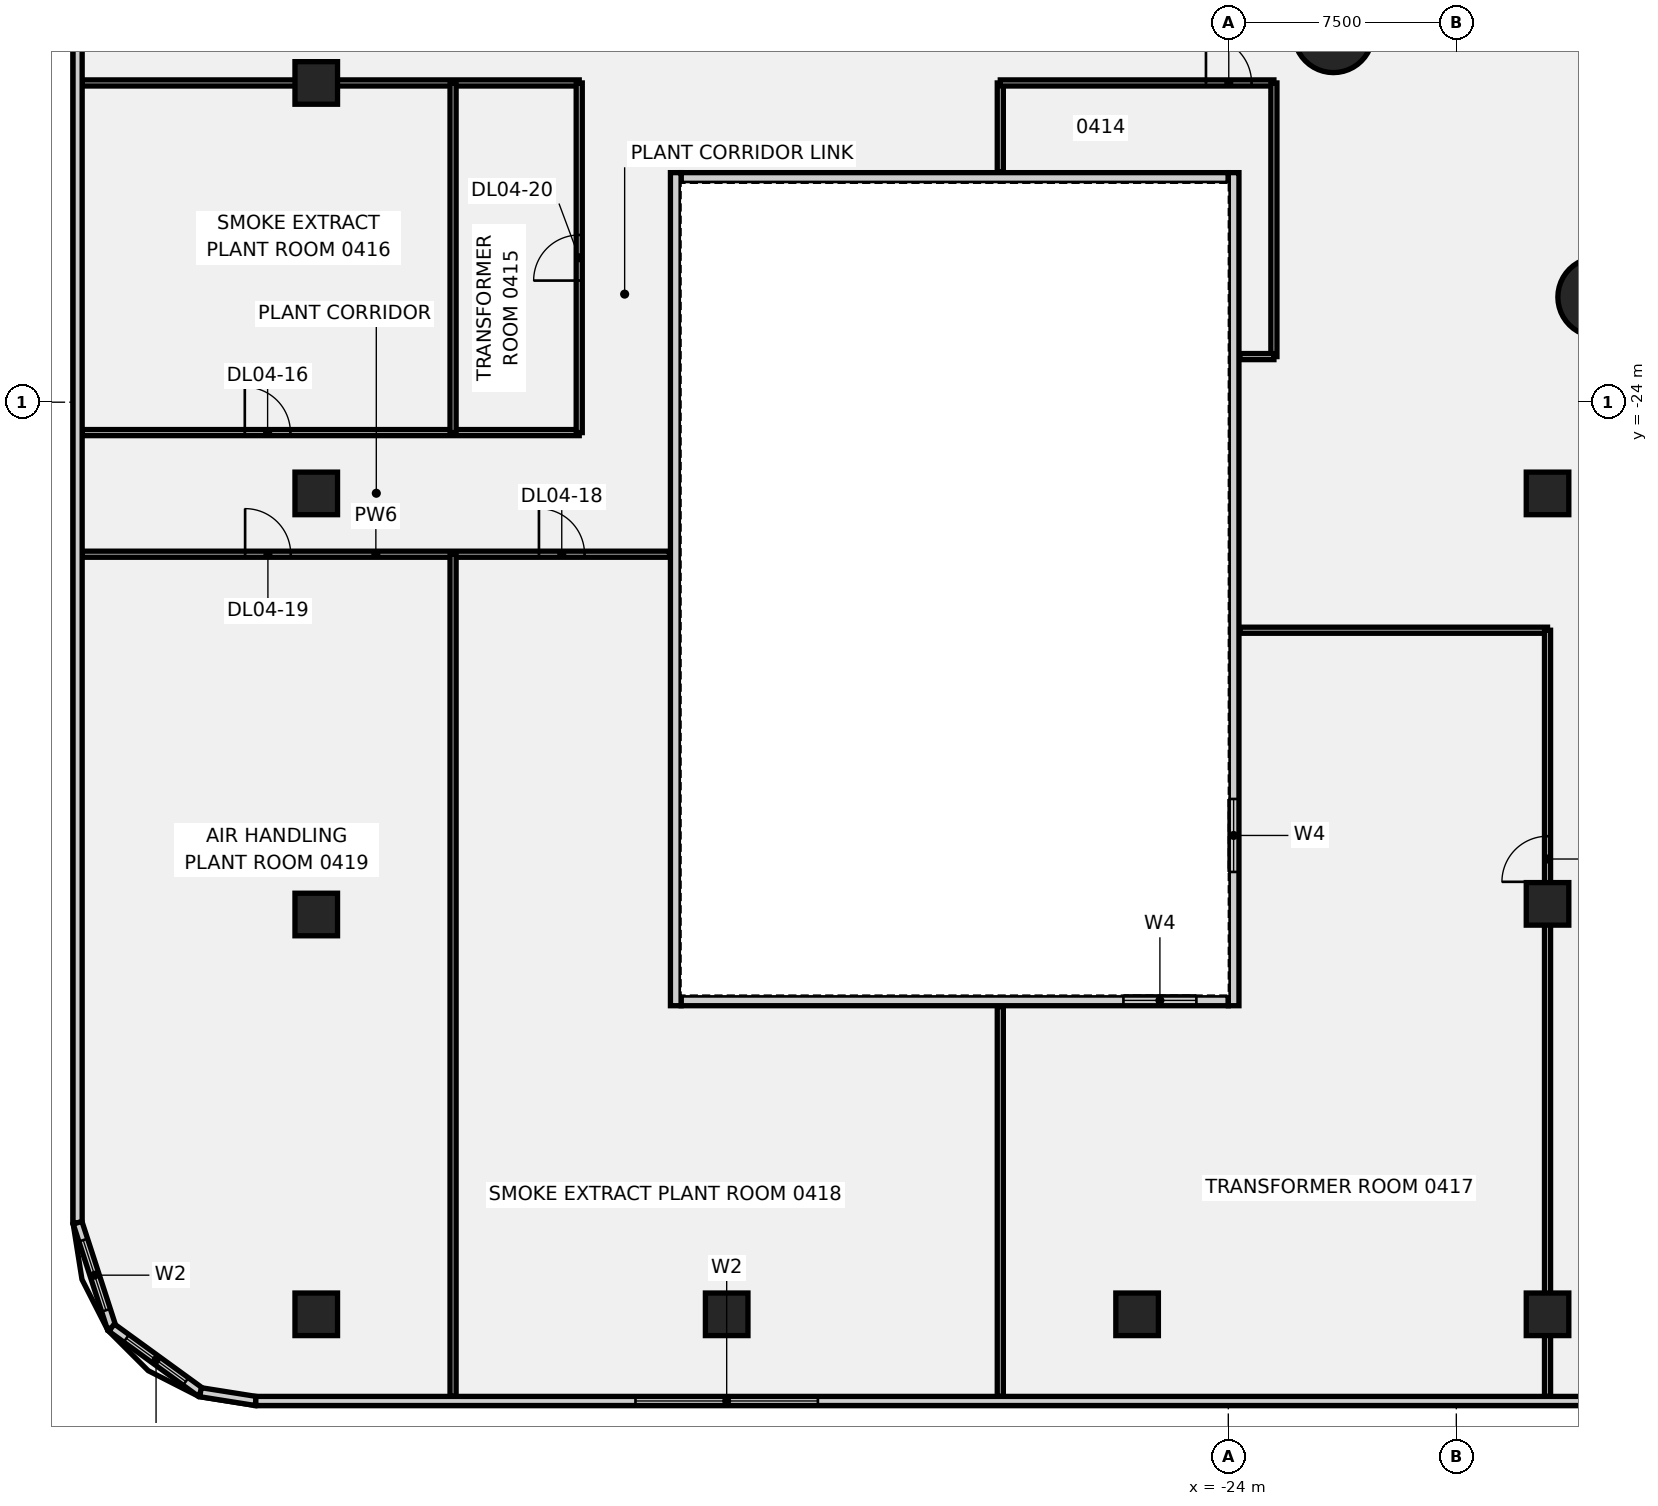
"""IFC4 building model, lengths in metres.
Left out: names, types, materials, properties, quantities, classifications, styles, units other than length and angle.
Written with IfcOpenShell. Run it as: python <this file> out.ifc"""

import sys

from ifc_helpers import new_model, si_unit, direction, frame, frame_2d, origin, origin_2d, place, context, subcontext, project, spatial, rectangle, circle, extrude, element, fill, save


model = new_model("IFC4")
c1 = context("Model", 3, precision=1e-05, world=origin(), true_north=direction((0.0, 1.0)))
c2 = subcontext(c1, "Body", "Model", "MODEL_VIEW")
j1 = project(units=[si_unit("LENGTHUNIT", "METRE"), si_unit("PLANEANGLEUNIT", "RADIAN")], contexts=[c1])
p1 = place(None, origin())
s1 = spatial("IfcSite", under=j1, at=p1, CompositionType="ELEMENT")
p2 = place(p1, origin())
s2 = spatial("IfcBuilding", under=s1, at=p2, CompositionType="ELEMENT")
p3 = place(p2, frame((0.0, 0.0, 25.0)))
s3 = spatial("IfcBuildingStorey", under=s2, at=p3, CompositionType="ELEMENT", Elevation=25.0)
for number, where, z_axis, x_axis in (
    (1, (-20.543, -11.86, -0.45), (0.0, 0.0, 1.0), (1.0, 0.0, 0.0)),
    (2, (-11.86, -20.543, -0.45), (0.0, 0.0, 1.0), (1.0, 0.0, 0.0)),
):
    element("IfcColumn", number, at=place(p3, frame(where, z_axis=z_axis, x_axis=x_axis)), inside=s3, PredefinedType="COLUMN", context=c2, shape_type="SweptSolid", body=[
        extrude(circle(Radius=1.3, at=origin_2d()), origin(), (0.0, 0.0, 1.0), 4.35),
    ])
for number, where, z_axis, x_axis in (
    (3, (-54.0, -54.0, -0.45), (0.0, 0.0, 1.0), (1.0, 0.0, 0.0)),
    (4, (-54.0, -40.85, -0.45), (0.0, 0.0, 1.0), (1.0, 0.0, 0.0)),
    (5, (-54.0, -27.0, -0.45), (0.0, 0.0, 1.0), (1.0, 0.0, 0.0)),
    (6, (-54.0, -13.5, -0.45), (0.0, 0.0, 1.0), (1.0, 0.0, 0.0)),
    (7, (-40.5, -54.0, -0.45), (0.0, 0.0, 1.0), (1.0, 0.0, 0.0)),
    (8, (-27.0, -54.0, -0.45), (0.0, 0.0, 1.0), (1.0, 0.0, 0.0)),
    (9, (-13.5, -54.0, -0.45), (0.0, 0.0, 1.0), (1.0, 0.0, 0.0)),
    (10, (-13.5, -40.5, -0.45), (0.0, 0.0, 1.0), (1.0, 0.0, 0.0)),
    (11, (-13.5, -27.0, -0.45), (0.0, 0.0, 1.0), (1.0, 0.0, 0.0)),
):
    element("IfcColumn", number, at=place(p3, frame(where, z_axis=z_axis, x_axis=x_axis)), inside=s3, PredefinedType="COLUMN", context=c2, shape_type="SweptSolid", body=[
        extrude(rectangle(XDim=1.4, YDim=1.4, at=origin_2d()), origin(), (0.0, 0.0, 1.0), 4.35),
    ])
p4 = place(p3, frame((-61.699, -29.0, 0.0), z_axis=(0.0, 0.0, 1.0), x_axis=(1.0, 0.0, 0.0)))
e12 = element("IfcWall", 12, at=p4, inside=s3, PredefinedType="PARTITIONING", context=c2, shape_type="SweptSolid", body=[
    extrude(rectangle(XDim=19.319, YDim=0.2, at=frame_2d((9.66, 0.0))), origin(), (0.0, 0.0, 1.0), 3.9),
])
p5 = place(p4, frame((15.024, 0.0, 0.0)))
e13 = element("IfcOpeningElement", 13, at=p5, cuts=e12, PredefinedType="OPENING", context=c2, shape_type="SweptSolid", body=[
    extrude(rectangle(XDim=1.5, YDim=2.1, at=frame_2d((0.75, 1.05))), frame((0.0, 0.11, 0.0), z_axis=(0.0, -1.0, 0.0), x_axis=(1.0, 0.0, 0.0)), (0.0, 0.0, 1.0), 0.22),
])
p6 = place(p4, frame((5.359, 0.0, 0.0)))
e14 = element("IfcOpeningElement", 14, at=p6, cuts=e12, PredefinedType="OPENING", context=c2, shape_type="SweptSolid", body=[
    extrude(rectangle(XDim=1.5, YDim=2.1, at=frame_2d((0.75, 1.05))), frame((0.0, 0.11, 0.0), z_axis=(0.0, -1.0, 0.0), x_axis=(1.0, 0.0, 0.0)), (0.0, 0.0, 1.0), 0.22),
])
p7 = place(p3, frame((-61.699, -25.0, 0.0), z_axis=(0.0, 0.0, 1.0), x_axis=(1.0, 0.0, 0.0)))
e15 = element("IfcWall", 15, at=p7, inside=s3, PredefinedType="PARTITIONING", context=c2, shape_type="SweptSolid", body=[
    extrude(rectangle(XDim=16.349, YDim=0.2, at=frame_2d((8.174, 0.0))), origin(), (0.0, 0.0, 1.0), 3.9),
])
p8 = place(p7, frame((5.349, 0.0, 0.0)))
e16 = element("IfcOpeningElement", 16, at=p8, cuts=e15, PredefinedType="OPENING", context=c2, shape_type="SweptSolid", body=[
    extrude(rectangle(XDim=1.5, YDim=2.1, at=frame_2d((0.75, 1.05))), frame((0.0, 0.11, 0.0), z_axis=(0.0, -1.0, 0.0), x_axis=(1.0, 0.0, 0.0)), (0.0, 0.0, 1.0), 0.22),
])
p9 = place(p3, frame((-61.699, -13.5, 0.0), z_axis=(0.0, 0.0, 1.0), x_axis=(1.0, 0.0, 0.0)))
e17 = element("IfcWall", 17, at=p9, inside=s3, PredefinedType="PARTITIONING", context=c2, shape_type="SweptSolid", body=[
    extrude(rectangle(XDim=16.349, YDim=0.2, at=frame_2d((8.174, 0.0))), origin(), (0.0, 0.0, 1.0), 3.9),
])
p10 = place(p3, frame((-49.5, -56.699, 0.0), z_axis=(0.0, 0.0, 1.0), x_axis=(0.0, 1.0, 0.0)))
e18 = element("IfcWall", 18, at=p10, inside=s3, PredefinedType="PARTITIONING", context=c2, shape_type="SweptSolid", body=[
    extrude(rectangle(XDim=27.699, YDim=0.2, at=frame_2d((13.85, 0.0))), origin(), (0.0, 0.0, 1.0), 3.9),
])
p11 = place(p3, frame((-49.5, -25.0, 0.0), z_axis=(0.0, 0.0, 1.0), x_axis=(0.0, 1.0, 0.0)))
e19 = element("IfcWall", 19, at=p11, inside=s3, PredefinedType="PARTITIONING", context=c2, shape_type="SweptSolid", body=[
    extrude(rectangle(XDim=11.5, YDim=0.2, at=frame_2d((5.75, 0.0))), origin(), (0.0, 0.0, 1.0), 3.9),
])
p12 = place(p3, frame((-45.35, -25.0, 0.0), z_axis=(0.0, 0.0, 1.0), x_axis=(0.0, 1.0, 0.0)))
e20 = element("IfcWall", 20, at=p12, inside=s3, PredefinedType="PARTITIONING", context=c2, shape_type="SweptSolid", body=[
    extrude(rectangle(XDim=11.5, YDim=0.2, at=frame_2d((5.75, 0.0))), origin(), (0.0, 0.0, 1.0), 3.9),
])
p13 = place(p12, frame((5.0, 0.0, 0.0)))
e21 = element("IfcOpeningElement", 21, at=p13, cuts=e20, PredefinedType="OPENING", context=c2, shape_type="SweptSolid", body=[
    extrude(rectangle(XDim=1.5, YDim=2.1, at=frame_2d((0.75, 1.05))), frame((0.0, 0.11, 0.0), z_axis=(0.0, -1.0, 0.0), x_axis=(1.0, 0.0, 0.0)), (0.0, 0.0, 1.0), 0.22),
])
p14 = place(p3, frame((-31.5, -56.699, 0.0), z_axis=(0.0, 0.0, 1.0), x_axis=(0.0, 1.0, 0.0)))
e22 = element("IfcWall", 22, at=p14, inside=s3, PredefinedType="PARTITIONING", context=c2, shape_type="SweptSolid", body=[
    extrude(rectangle(XDim=12.819, YDim=0.2, at=frame_2d((6.41, 0.0))), origin(), (0.0, 0.0, 1.0), 3.9),
])
p15 = place(p3, frame((-31.5, -16.42, 0.0), z_axis=(0.0, 0.0, 1.0), x_axis=(0.0, 1.0, 0.0)))
e23 = element("IfcWall", 23, at=p15, inside=s3, PredefinedType="PARTITIONING", context=c2, shape_type="SweptSolid", body=[
    extrude(rectangle(XDim=2.92, YDim=0.2, at=frame_2d((1.46, 0.0))), origin(), (0.0, 0.0, 1.0), 3.9),
])
p16 = place(p3, frame((-31.5, -13.5, 0.0), z_axis=(0.0, 0.0, 1.0), x_axis=(1.0, 0.0, 0.0)))
e24 = element("IfcWall", 24, at=p16, inside=s3, PredefinedType="PARTITIONING", context=c2, shape_type="SweptSolid", body=[
    extrude(rectangle(XDim=9.0, YDim=0.2, at=frame_2d((4.5, 0.0))), origin(), (0.0, 0.0, 1.0), 3.9),
])
p17 = place(p16, frame((6.765, 0.0, 0.0)))
e25 = element("IfcOpeningElement", 25, at=p17, cuts=e24, PredefinedType="OPENING", context=c2, shape_type="SweptSolid", body=[
    extrude(rectangle(XDim=1.5, YDim=2.1, at=frame_2d((0.75, 1.05))), frame((0.0, 0.11, 0.0), z_axis=(0.0, -1.0, 0.0), x_axis=(1.0, 0.0, 0.0)), (0.0, 0.0, 1.0), 0.22),
])
p18 = place(p3, frame((-22.5, -22.5, 0.0), z_axis=(0.0, 0.0, 1.0), x_axis=(0.0, 1.0, 0.0)))
e26 = element("IfcWall", 26, at=p18, inside=s3, PredefinedType="PARTITIONING", context=c2, shape_type="SweptSolid", body=[
    extrude(rectangle(XDim=9.0, YDim=0.2, at=frame_2d((4.5, 0.0))), origin(), (0.0, 0.0, 1.0), 3.9),
])
p19 = place(p3, frame((-23.62, -22.5, 0.0), z_axis=(0.0, 0.0, 1.0), x_axis=(1.0, 0.0, 0.0)))
e27 = element("IfcWall", 27, at=p19, inside=s3, PredefinedType="PARTITIONING", context=c2, shape_type="SweptSolid", body=[
    extrude(rectangle(XDim=1.12, YDim=0.2, at=frame_2d((0.56, 0.0))), origin(), (0.0, 0.0, 1.0), 3.9),
])
p20 = place(p3, frame((-23.62, -31.5, 0.0), z_axis=(0.0, 0.0, 1.0), x_axis=(1.0, 0.0, 0.0)))
e28 = element("IfcWall", 28, at=p20, inside=s3, PredefinedType="PARTITIONING", context=c2, shape_type="SweptSolid", body=[
    extrude(rectangle(XDim=10.12, YDim=0.2, at=frame_2d((5.06, 0.0))), origin(), (0.0, 0.0, 1.0), 3.9),
])
p21 = place(p3, frame((-13.5, -56.699, 0.0), z_axis=(0.0, 0.0, 1.0), x_axis=(0.0, 1.0, 0.0)))
e29 = element("IfcWall", 29, at=p21, inside=s3, PredefinedType="PARTITIONING", context=c2, shape_type="SweptSolid", body=[
    extrude(rectangle(XDim=25.199, YDim=0.2, at=frame_2d((12.6, 0.0))), origin(), (0.0, 0.0, 1.0), 3.9),
])
p22 = place(p21, frame((16.924, 0.0, 0.0)))
e30 = element("IfcOpeningElement", 30, at=p22, cuts=e29, PredefinedType="OPENING", context=c2, shape_type="SweptSolid", body=[
    extrude(rectangle(XDim=1.5, YDim=2.1, at=frame_2d((0.75, 1.05))), frame((0.0, 0.11, 0.0), z_axis=(0.0, -1.0, 0.0), x_axis=(1.0, 0.0, 0.0)), (0.0, 0.0, 1.0), 0.22),
])
p23 = place(p3, frame((-61.85, 50.988, 0.0), z_axis=(0.0, 0.0, 1.0), x_axis=(0.0, -1.0, 0.0)))
e31 = element("IfcWall", 31, at=p23, inside=s3, PredefinedType="SOLIDWALL", context=c2, shape_type="SweptSolid", body=[
    extrude(rectangle(XDim=101.977, YDim=0.3, at=frame_2d((50.988, 0.0))), origin(), (0.0, 0.0, 1.0), 3.9),
])
p24 = place(p23, frame((47.988, 0.0, 1.4)))
e32 = element("IfcOpeningElement", 32, at=p24, cuts=e31, PredefinedType="OPENING", context=c2, shape_type="SweptSolid", body=[
    extrude(rectangle(XDim=6.0, YDim=2.2, at=frame_2d((3.0, 1.1))), frame((0.0, 0.16, 0.0), z_axis=(0.0, -1.0, 0.0), x_axis=(1.0, 0.0, 0.0)), (0.0, 0.0, 1.0), 0.32),
])
p25 = place(p3, frame((-61.85, -50.988, 0.0), z_axis=(0.0, 0.0, 1.0), x_axis=(0.308562324189, -0.951204127457, 0.0)))
e33 = element("IfcWall", 33, at=p25, inside=s3, PredefinedType="SOLIDWALL", context=c2, shape_type="SweptSolid", body=[
    extrude(rectangle(XDim=3.626, YDim=0.3, at=frame_2d((1.813, 0.0))), origin(), (0.0, 0.0, 1.0), 3.9),
])
p26 = place(p25, frame((0.6, 0.0, 1.4)))
e34 = element("IfcOpeningElement", 34, at=p26, cuts=e33, PredefinedType="OPENING", context=c2, shape_type="SweptSolid", body=[
    extrude(rectangle(XDim=2.426, YDim=2.2, at=frame_2d((1.213, 1.1))), frame((0.0, 0.16, 0.0), z_axis=(0.0, -1.0, 0.0), x_axis=(1.0, 0.0, 0.0)), (0.0, 0.0, 1.0), 0.32),
])
p27 = place(p3, frame((-60.731, -54.438, 0.0), z_axis=(0.0, 0.0, 1.0), x_axis=(0.80901056566, -0.587794100557, 0.0)))
e35 = element("IfcWall", 35, at=p27, inside=s3, PredefinedType="SOLIDWALL", context=c2, shape_type="SweptSolid", body=[
    extrude(rectangle(XDim=3.615, YDim=0.3, at=frame_2d((1.807, 0.0))), origin(), (0.0, 0.0, 1.0), 3.9),
])
p28 = place(p27, frame((0.6, 0.0, 1.4)))
e36 = element("IfcOpeningElement", 36, at=p28, cuts=e35, PredefinedType="OPENING", context=c2, shape_type="SweptSolid", body=[
    extrude(rectangle(XDim=2.414, YDim=2.2, at=frame_2d((1.207, 1.1))), frame((0.0, 0.16, 0.0), z_axis=(0.0, -1.0, 0.0), x_axis=(1.0, 0.0, 0.0)), (0.0, 0.0, 1.0), 0.32),
])
p29 = place(p3, frame((-57.807, -56.562, 0.0), z_axis=(0.0, 0.0, 1.0), x_axis=(0.987687604806, -0.15643911056, 0.0)))
e37 = element("IfcWall", 37, at=p29, inside=s3, PredefinedType="SOLIDWALL", context=c2, shape_type="SweptSolid", body=[
    extrude(rectangle(XDim=1.842, YDim=0.3, at=frame_2d((0.921, 0.0))), origin(), (0.0, 0.0, 1.0), 3.9),
])
p30 = place(p3, frame((-55.988, -56.85, 0.0), z_axis=(0.0, 0.0, 1.0), x_axis=(1.0, 0.0, 0.0)))
e38 = element("IfcWall", 38, at=p30, inside=s3, PredefinedType="SOLIDWALL", context=c2, shape_type="SweptSolid", body=[
    extrude(rectangle(XDim=111.977, YDim=0.3, at=frame_2d((55.988, 0.0))), origin(), (0.0, 0.0, 1.0), 3.9),
])
p31 = place(p30, frame((12.488, 0.0, 1.4)))
e39 = element("IfcOpeningElement", 39, at=p31, cuts=e38, PredefinedType="OPENING", context=c2, shape_type="SweptSolid", body=[
    extrude(rectangle(XDim=6.0, YDim=2.2, at=frame_2d((3.0, 1.1))), frame((0.0, 0.16, 0.0), z_axis=(0.0, -1.0, 0.0), x_axis=(1.0, 0.0, 0.0)), (0.0, 0.0, 1.0), 0.32),
])
p32 = place(p3, frame((-42.0, -43.675, 0.0), z_axis=(0.0, 0.0, 1.0), x_axis=(1.0, 0.0, 0.0)))
e40 = element("IfcWall", 40, at=p32, inside=s3, PredefinedType="SOLIDWALL", context=c2, shape_type="SweptSolid", body=[
    extrude(rectangle(XDim=18.0, YDim=0.35, at=frame_2d((9.0, 0.0))), origin(), (0.0, 0.0, 1.0), 3.9),
])
p33 = place(p32, frame((14.55, 0.0, 1.0)))
e41 = element("IfcOpeningElement", 41, at=p33, cuts=e40, PredefinedType="OPENING", context=c2, shape_type="SweptSolid", body=[
    extrude(rectangle(XDim=2.4, YDim=1.8, at=frame_2d((1.2, 0.9))), frame((0.0, 0.185, 0.0), z_axis=(0.0, -1.0, 0.0), x_axis=(1.0, 0.0, 0.0)), (0.0, 0.0, 1.0), 0.37),
])
p34 = place(p3, frame((-42.0, -16.625, 0.0), z_axis=(0.0, 0.0, 1.0), x_axis=(1.0, 0.0, 0.0)))
e42 = element("IfcWall", 42, at=p34, inside=s3, PredefinedType="SOLIDWALL", context=c2, shape_type="SweptSolid", body=[
    extrude(rectangle(XDim=18.0, YDim=0.35, at=frame_2d((9.0, 0.0))), origin(), (0.0, 0.0, 1.0), 3.9),
])
p35 = place(p3, frame((-42.175, -43.85, 0.0), z_axis=(0.0, 0.0, 1.0), x_axis=(0.0, 1.0, 0.0)))
e43 = element("IfcWall", 43, at=p35, inside=s3, PredefinedType="SOLIDWALL", context=c2, shape_type="SweptSolid", body=[
    extrude(rectangle(XDim=27.4, YDim=0.35, at=frame_2d((13.7, 0.0))), origin(), (0.0, 0.0, 1.0), 3.9),
])
p36 = place(p3, frame((-23.825, -43.85, 0.0), z_axis=(0.0, 0.0, 1.0), x_axis=(0.0, 1.0, 0.0)))
e44 = element("IfcWall", 44, at=p36, inside=s3, PredefinedType="SOLIDWALL", context=c2, shape_type="SweptSolid", body=[
    extrude(rectangle(XDim=27.4, YDim=0.35, at=frame_2d((13.7, 0.0))), origin(), (0.0, 0.0, 1.0), 3.9),
])
p37 = place(p36, frame((4.4, 0.0, 1.0)))
e45 = element("IfcOpeningElement", 45, at=p37, cuts=e44, PredefinedType="OPENING", context=c2, shape_type="SweptSolid", body=[
    extrude(rectangle(XDim=2.4, YDim=1.8, at=frame_2d((1.2, 0.9))), frame((0.0, 0.185, 0.0), z_axis=(0.0, -1.0, 0.0), x_axis=(1.0, 0.0, 0.0)), (0.0, 0.0, 1.0), 0.37),
])
p38 = place(p17, origin())
e46 = element("IfcDoor", 46, at=p38, inside=s3, OperationType="SINGLE_SWING_LEFT", PredefinedType="DOOR", context=c2, shape_type="SweptSolid", body=[
    extrude(rectangle(XDim=1.5, YDim=2.1, at=frame_2d((0.75, 1.05))), frame((0.0, 0.025, 0.0), z_axis=(0.0, -1.0, 0.0), x_axis=(1.0, 0.0, 0.0)), (0.0, 0.0, 1.0), 0.05),
])
fill(e25, e46)
p39 = place(p8, origin())
e47 = element("IfcDoor", 47, at=p39, inside=s3, OperationType="SINGLE_SWING_RIGHT", PredefinedType="DOOR", context=c2, shape_type="SweptSolid", body=[
    extrude(rectangle(XDim=1.5, YDim=2.1, at=frame_2d((0.75, 1.05))), frame((0.0, 0.025, 0.0), z_axis=(0.0, -1.0, 0.0), x_axis=(1.0, 0.0, 0.0)), (0.0, 0.0, 1.0), 0.05),
])
fill(e16, e47)
p40 = place(p22, origin())
e48 = element("IfcDoor", 48, at=p40, inside=s3, OperationType="SINGLE_SWING_LEFT", PredefinedType="DOOR", context=c2, shape_type="SweptSolid", body=[
    extrude(rectangle(XDim=1.5, YDim=2.1, at=frame_2d((0.75, 1.05))), frame((0.0, 0.025, 0.0), z_axis=(0.0, -1.0, 0.0), x_axis=(1.0, 0.0, 0.0)), (0.0, 0.0, 1.0), 0.05),
])
fill(e30, e48)
p41 = place(p5, origin())
e49 = element("IfcDoor", 49, at=p41, inside=s3, OperationType="SINGLE_SWING_RIGHT", PredefinedType="DOOR", context=c2, shape_type="SweptSolid", body=[
    extrude(rectangle(XDim=1.5, YDim=2.1, at=frame_2d((0.75, 1.05))), frame((0.0, 0.025, 0.0), z_axis=(0.0, -1.0, 0.0), x_axis=(1.0, 0.0, 0.0)), (0.0, 0.0, 1.0), 0.05),
])
fill(e13, e49)
p42 = place(p6, origin())
e50 = element("IfcDoor", 50, at=p42, inside=s3, OperationType="SINGLE_SWING_LEFT", PredefinedType="DOOR", context=c2, shape_type="SweptSolid", body=[
    extrude(rectangle(XDim=1.5, YDim=2.1, at=frame_2d((0.75, 1.05))), frame((0.0, 0.025, 0.0), z_axis=(0.0, -1.0, 0.0), x_axis=(1.0, 0.0, 0.0)), (0.0, 0.0, 1.0), 0.05),
])
fill(e14, e50)
p43 = place(p13, origin())
e51 = element("IfcDoor", 51, at=p43, inside=s3, OperationType="SINGLE_SWING_RIGHT", PredefinedType="DOOR", context=c2, shape_type="SweptSolid", body=[
    extrude(rectangle(XDim=1.5, YDim=2.1, at=frame_2d((0.75, 1.05))), frame((0.0, 0.025, 0.0), z_axis=(0.0, -1.0, 0.0), x_axis=(1.0, 0.0, 0.0)), (0.0, 0.0, 1.0), 0.05),
])
fill(e21, e51)
p44 = place(p26, origin())
e52 = element("IfcWindow", 52, at=p44, inside=s3, PartitioningType="SINGLE_PANEL", PredefinedType="WINDOW", context=c2, shape_type="SweptSolid", body=[
    extrude(rectangle(XDim=2.426, YDim=2.2, at=frame_2d((1.213, 1.1))), frame((0.0, 0.03, 0.0), z_axis=(0.0, -1.0, 0.0), x_axis=(1.0, 0.0, 0.0)), (0.0, 0.0, 1.0), 0.06),
])
fill(e34, e52)
p45 = place(p28, origin())
e53 = element("IfcWindow", 53, at=p45, inside=s3, PartitioningType="SINGLE_PANEL", PredefinedType="WINDOW", context=c2, shape_type="SweptSolid", body=[
    extrude(rectangle(XDim=2.414, YDim=2.2, at=frame_2d((1.207, 1.1))), frame((0.0, 0.03, 0.0), z_axis=(0.0, -1.0, 0.0), x_axis=(1.0, 0.0, 0.0)), (0.0, 0.0, 1.0), 0.06),
])
fill(e36, e53)
p46 = place(p31, origin())
e54 = element("IfcWindow", 54, at=p46, inside=s3, PartitioningType="SINGLE_PANEL", PredefinedType="WINDOW", context=c2, shape_type="SweptSolid", body=[
    extrude(rectangle(XDim=6.0, YDim=2.2, at=frame_2d((3.0, 1.1))), frame((0.0, 0.03, 0.0), z_axis=(0.0, -1.0, 0.0), x_axis=(1.0, 0.0, 0.0)), (0.0, 0.0, 1.0), 0.06),
])
fill(e39, e54)
p47 = place(p33, origin())
e55 = element("IfcWindow", 55, at=p47, inside=s3, PartitioningType="SINGLE_PANEL", PredefinedType="WINDOW", context=c2, shape_type="SweptSolid", body=[
    extrude(rectangle(XDim=2.4, YDim=1.8, at=frame_2d((1.2, 0.9))), frame((0.0, 0.03, 0.0), z_axis=(0.0, -1.0, 0.0), x_axis=(1.0, 0.0, 0.0)), (0.0, 0.0, 1.0), 0.06),
])
fill(e41, e55)
p48 = place(p37, origin())
e56 = element("IfcWindow", 56, at=p48, inside=s3, PartitioningType="SINGLE_PANEL", PredefinedType="WINDOW", context=c2, shape_type="SweptSolid", body=[
    extrude(rectangle(XDim=2.4, YDim=1.8, at=frame_2d((1.2, 0.9))), frame((0.0, 0.03, 0.0), z_axis=(0.0, -1.0, 0.0), x_axis=(1.0, 0.0, 0.0)), (0.0, 0.0, 1.0), 0.06),
])
fill(e45, e56)
save(model, sys.argv[1])
